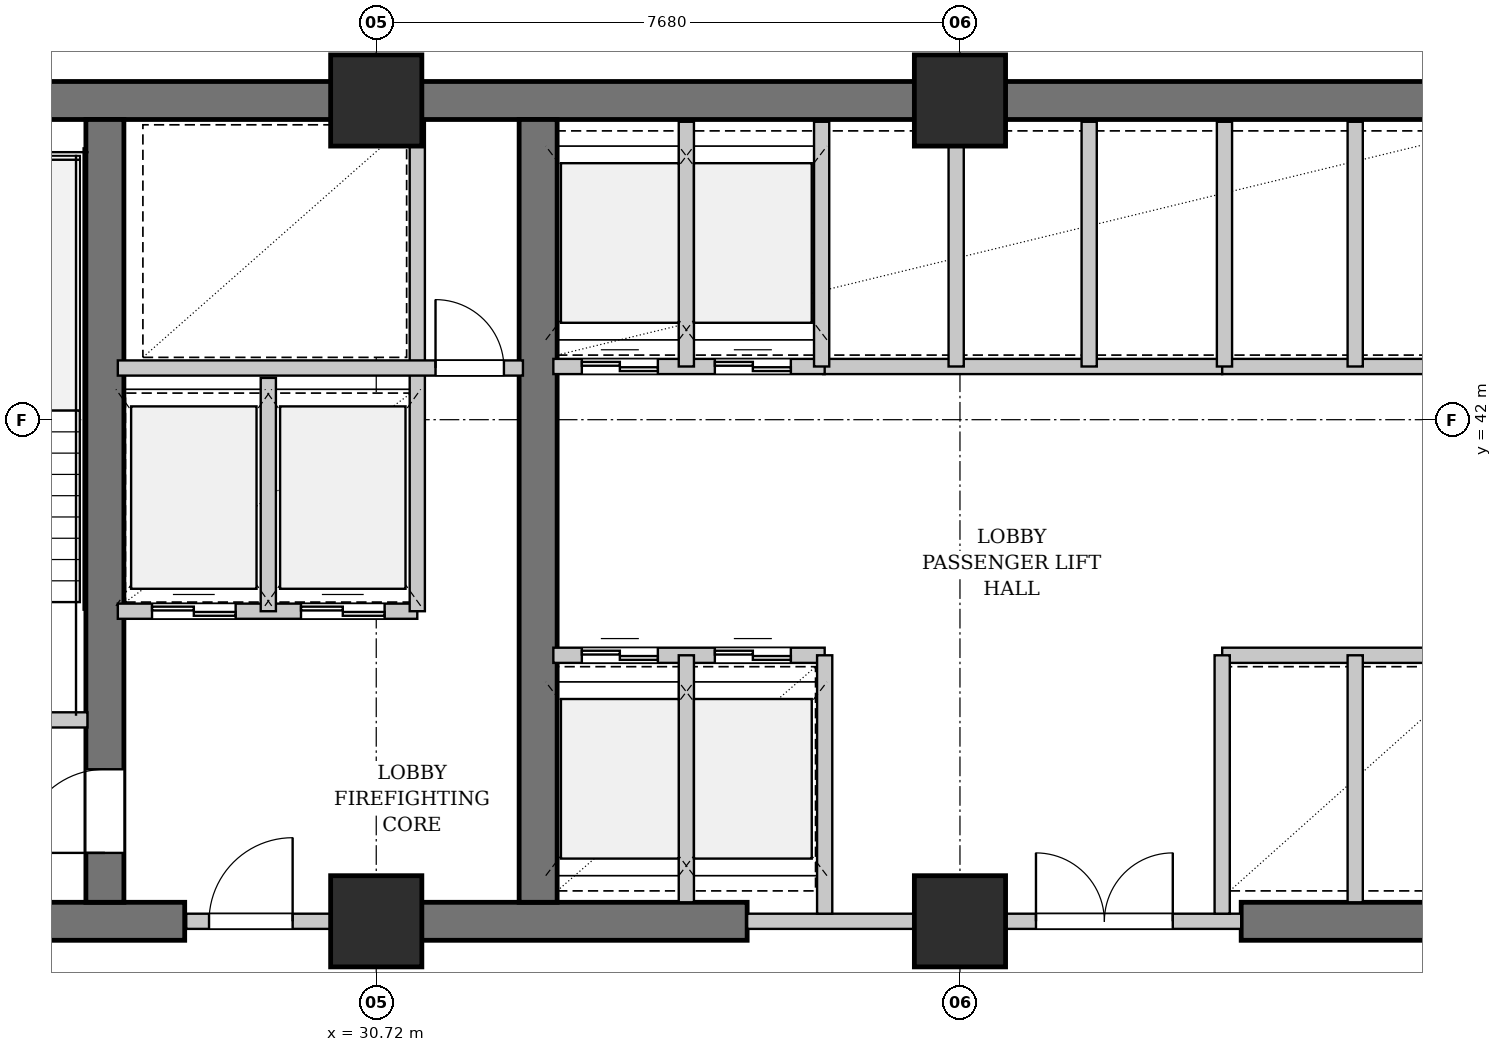
"""IFC4 building model, lengths in metres.
Left out: names, types, materials, properties, quantities, classifications, styles, units other than length and angle.
Written with IfcOpenShell. Run it as: python <this file> out.ifc"""

import sys

from ifc_helpers import new_model, si_unit, direction, frame, frame_2d, origin, origin_2d, place, context, subcontext, project, spatial, rectangle, extrude, element, fill, save


model = new_model("IFC4")
c1 = context("Model", 3, precision=1e-05, world=origin(), true_north=direction((0.0, 1.0)))
c2 = subcontext(c1, "Body", "Model", "MODEL_VIEW")
j1 = project(units=[si_unit("LENGTHUNIT", "METRE"), si_unit("PLANEANGLEUNIT", "RADIAN")], contexts=[c1])
p1 = place(None, origin())
s1 = spatial("IfcSite", under=j1, at=p1, CompositionType="ELEMENT")
p2 = place(p1, origin())
s2 = spatial("IfcBuilding", under=s1, at=p2, CompositionType="ELEMENT")
p3 = place(p2, frame((0.0, 0.0, 54.2)))
s3 = spatial("IfcBuildingStorey", under=s2, at=p3, CompositionType="ELEMENT", Elevation=54.2)
p4 = place(p3, frame((22.79, 46.2, 0.0), z_axis=(0.0, 0.0, 1.0), x_axis=(1.0, 0.0, 0.0)))
e1 = element("IfcWall", 1, at=p4, inside=s3, PredefinedType="SHEAR", context=c2, shape_type="SweptSolid", body=[
    extrude(rectangle(XDim=31.22, YDim=0.5, at=frame_2d((15.61, 0.0))), origin(), (0.0, 0.0, 1.0), 3.18),
])
p5 = place(p3, frame((22.79, 35.4, 0.0), z_axis=(0.0, 0.0, 1.0), x_axis=(1.0, 0.0, 0.0)))
e2 = element("IfcWall", 2, at=p5, inside=s3, PredefinedType="SHEAR", context=c2, shape_type="SweptSolid", body=[
    extrude(rectangle(XDim=5.41, YDim=0.5, at=frame_2d((2.705, 0.0))), origin(), (0.0, 0.0, 1.0), 3.18),
])
p6 = place(p3, frame((30.72, 35.4, 0.0), z_axis=(0.0, 0.0, 1.0), x_axis=(1.0, 0.0, 0.0)))
e3 = element("IfcWall", 3, at=p6, inside=s3, PredefinedType="SHEAR", context=c2, shape_type="SweptSolid", body=[
    extrude(rectangle(XDim=4.88, YDim=0.5, at=frame_2d((2.44, 0.0))), origin(), (0.0, 0.0, 1.0), 3.18),
])
p7 = place(p3, frame((42.1, 35.4, 0.0), z_axis=(0.0, 0.0, 1.0), x_axis=(1.0, 0.0, 0.0)))
e4 = element("IfcWall", 4, at=p7, inside=s3, PredefinedType="SHEAR", context=c2, shape_type="SweptSolid", body=[
    extrude(rectangle(XDim=8.05, YDim=0.5, at=frame_2d((4.025, 0.0))), origin(), (0.0, 0.0, 1.0), 3.18),
])
p8 = place(p7, frame((4.85, 0.0, 0.0)))
e5 = element("IfcOpeningElement", 5, at=p8, cuts=e4, PredefinedType="OPENING", context=c2, shape_type="SweptSolid", body=[
    extrude(rectangle(XDim=0.9, YDim=2.15, at=frame_2d((0.45, 1.075))), frame((0.0, 0.26, 0.0), z_axis=(0.0, -1.0, 0.0), x_axis=(1.0, 0.0, 0.0)), (0.0, 0.0, 1.0), 0.52),
])
p9 = place(p3, frame((27.15, 35.65, 0.0), z_axis=(0.0, 0.0, 1.0), x_axis=(0.0, 1.0, 0.0)))
e6 = element("IfcWall", 6, at=p9, inside=s3, PredefinedType="SHEAR", context=c2, shape_type="SweptSolid", body=[
    extrude(rectangle(XDim=10.3, YDim=0.5, at=frame_2d((5.15, 0.0))), origin(), (0.0, 0.0, 1.0), 3.18),
])
p10 = place(p9, frame((0.65, 0.0, 0.0)))
e7 = element("IfcOpeningElement", 7, at=p10, cuts=e6, PredefinedType="OPENING", context=c2, shape_type="SweptSolid", body=[
    extrude(rectangle(XDim=1.1, YDim=2.15, at=frame_2d((0.55, 1.075))), frame((0.0, 0.26, 0.0), z_axis=(0.0, -1.0, 0.0), x_axis=(1.0, 0.0, 0.0)), (0.0, 0.0, 1.0), 0.52),
])
p11 = place(p3, frame((32.85, 35.65, 0.0), z_axis=(0.0, 0.0, 1.0), x_axis=(0.0, 1.0, 0.0)))
e8 = element("IfcWall", 8, at=p11, inside=s3, PredefinedType="SHEAR", context=c2, shape_type="SweptSolid", body=[
    extrude(rectangle(XDim=10.3, YDim=0.5, at=frame_2d((5.15, 0.0))), origin(), (0.0, 0.0, 1.0), 3.18),
])
for number, where, z_axis, x_axis in (
    (9, (30.72, 35.4, 0.0), (0.0, 0.0, 1.0), (1.0, 0.0, 0.0)),
    (10, (30.72, 46.2, 0.0), (0.0, 0.0, 1.0), (1.0, 0.0, 0.0)),
    (11, (38.4, 35.4, 0.0), (0.0, 0.0, 1.0), (1.0, 0.0, 0.0)),
    (12, (38.4, 46.2, 0.0), (0.0, 0.0, 1.0), (1.0, 0.0, 0.0)),
):
    element("IfcColumn", number, at=place(p3, frame(where, z_axis=z_axis, x_axis=x_axis)), inside=s3, PredefinedType="COLUMN", context=c2, shape_type="SweptSolid", body=[
        extrude(rectangle(XDim=1.2, YDim=1.2, at=origin_2d()), origin(), (0.0, 0.0, 1.0), 3.4),
    ])
p12 = place(p3, frame((23.3, 38.05, 0.0), z_axis=(0.0, 0.0, 1.0), x_axis=(1.0, 0.0, 0.0)))
e13 = element("IfcWall", 13, at=p12, inside=s3, PredefinedType="PARTITIONING", context=c2, shape_type="SweptSolid", body=[
    extrude(rectangle(XDim=3.62, YDim=0.2, at=frame_2d((1.81, 0.0))), origin(), (0.0, 0.0, 1.0), 3.18),
])
p13 = place(p12, frame((1.26, 0.0, 0.0)))
e14 = element("IfcOpeningElement", 14, at=p13, cuts=e13, PredefinedType="OPENING", context=c2, shape_type="SweptSolid", body=[
    extrude(rectangle(XDim=1.1, YDim=2.15, at=frame_2d((0.55, 1.075))), frame((0.0, 0.11, 0.0), z_axis=(0.0, -1.0, 0.0), x_axis=(1.0, 0.0, 0.0)), (0.0, 0.0, 1.0), 0.22),
])
p14 = place(p3, frame((28.22, 35.4, 0.0), z_axis=(0.0, 0.0, 1.0), x_axis=(1.0, 0.0, 0.0)))
e15 = element("IfcWall", 15, at=p14, inside=s3, PredefinedType="PARTITIONING", context=c2, shape_type="SweptSolid", body=[
    extrude(rectangle(XDim=2.5, YDim=0.2, at=frame_2d((1.25, 0.0))), origin(), (0.0, 0.0, 1.0), 2.475),
])
p15 = place(p14, frame((0.3, 0.0, 0.0)))
e16 = element("IfcOpeningElement", 16, at=p15, cuts=e15, PredefinedType="OPENING", context=c2, shape_type="SweptSolid", body=[
    extrude(rectangle(XDim=1.1, YDim=2.15, at=frame_2d((0.55, 1.075))), frame((0.0, 0.11, 0.0), z_axis=(0.0, -1.0, 0.0), x_axis=(1.0, 0.0, 0.0)), (0.0, 0.0, 1.0), 0.22),
])
p16 = place(p3, frame((27.32, 39.48, 0.0), z_axis=(0.0, 0.0, 1.0), x_axis=(1.0, 0.0, 0.0)))
e17 = element("IfcWall", 17, at=p16, inside=s3, PredefinedType="PARTITIONING", context=c2, shape_type="SweptSolid", body=[
    extrude(rectangle(XDim=3.94, YDim=0.2, at=frame_2d((1.97, 0.0))), origin(), (0.0, 0.0, 1.0), 3.18),
])
p17 = place(p16, frame((0.45, 0.0, 0.0)))
e18 = element("IfcOpeningElement", 18, at=p17, cuts=e17, PredefinedType="OPENING", context=c2, shape_type="SweptSolid", body=[
    extrude(rectangle(XDim=1.1, YDim=2.2, at=frame_2d((0.55, 1.1))), frame((0.0, 0.11, 0.0), z_axis=(0.0, -1.0, 0.0), x_axis=(1.0, 0.0, 0.0)), (0.0, 0.0, 1.0), 0.22),
])
p18 = place(p16, frame((2.41, 0.0, 0.0)))
e19 = element("IfcOpeningElement", 19, at=p18, cuts=e17, PredefinedType="OPENING", context=c2, shape_type="SweptSolid", body=[
    extrude(rectangle(XDim=1.1, YDim=2.2, at=frame_2d((0.55, 1.1))), frame((0.0, 0.11, 0.0), z_axis=(0.0, -1.0, 0.0), x_axis=(1.0, 0.0, 0.0)), (0.0, 0.0, 1.0), 0.22),
])
p19 = place(p3, frame((29.3, 39.48, 0.0), z_axis=(0.0, 0.0, 1.0), x_axis=(0.0, 1.0, 0.0)))
e20 = element("IfcWall", 20, at=p19, inside=s3, PredefinedType="PARTITIONING", context=c2, shape_type="SweptSolid", body=[
    extrude(rectangle(XDim=3.07, YDim=0.2, at=frame_2d((1.535, 0.0))), origin(), (0.0, 0.0, 1.0), 3.18),
])
p20 = place(p3, frame((31.26, 39.48, 0.0), z_axis=(0.0, 0.0, 1.0), x_axis=(0.0, 1.0, 0.0)))
e21 = element("IfcWall", 21, at=p20, inside=s3, PredefinedType="PARTITIONING", context=c2, shape_type="SweptSolid", body=[
    extrude(rectangle(XDim=6.44, YDim=0.2, at=frame_2d((3.22, 0.0))), origin(), (0.0, 0.0, 1.0), 3.18),
])
p21 = place(p3, frame((27.32, 42.68, 0.0), z_axis=(0.0, 0.0, 1.0), x_axis=(1.0, 0.0, 0.0)))
e22 = element("IfcWall", 22, at=p21, inside=s3, PredefinedType="PARTITIONING", context=c2, shape_type="SweptSolid", body=[
    extrude(rectangle(XDim=5.33, YDim=0.2, at=frame_2d((2.665, 0.0))), origin(), (0.0, 0.0, 1.0), 3.18),
])
p22 = place(p21, frame((4.18, 0.0, 0.0)))
e23 = element("IfcOpeningElement", 23, at=p22, cuts=e22, PredefinedType="OPENING", context=c2, shape_type="SweptSolid", body=[
    extrude(rectangle(XDim=0.9, YDim=2.15, at=frame_2d((0.45, 1.075))), frame((0.0, 0.11, 0.0), z_axis=(0.0, -1.0, 0.0), x_axis=(1.0, 0.0, 0.0)), (0.0, 0.0, 1.0), 0.22),
])
p23 = place(p3, frame((35.6, 35.4, 0.0), z_axis=(0.0, 0.0, 1.0), x_axis=(1.0, 0.0, 0.0)))
e24 = element("IfcWall", 24, at=p23, inside=s3, PredefinedType="PARTITIONING", context=c2, shape_type="SweptSolid", body=[
    extrude(rectangle(XDim=6.5, YDim=0.2, at=frame_2d((3.25, 0.0))), origin(), (0.0, 0.0, 1.0), 2.475),
])
p24 = place(p23, frame((3.8, 0.0, 0.0)))
e25 = element("IfcOpeningElement", 25, at=p24, cuts=e24, PredefinedType="OPENING", context=c2, shape_type="SweptSolid", body=[
    extrude(rectangle(XDim=1.8, YDim=2.3, at=frame_2d((0.9, 1.15))), frame((0.0, 0.11, 0.0), z_axis=(0.0, -1.0, 0.0), x_axis=(1.0, 0.0, 0.0)), (0.0, 0.0, 1.0), 0.22),
])
p25 = place(p3, frame((36.6, 42.7, 0.0), z_axis=(0.0, 0.0, 1.0), x_axis=(1.0, 0.0, 0.0)))
e26 = element("IfcWall", 26, at=p25, inside=s3, PredefinedType="PARTITIONING", context=c2, shape_type="SweptSolid", body=[
    extrude(rectangle(XDim=5.25, YDim=0.2, at=frame_2d((2.625, 0.0))), origin(), (0.0, 0.0, 1.0), 3.18),
])
p26 = place(p3, frame((38.35, 42.7, 0.0), z_axis=(0.0, 0.0, 1.0), x_axis=(0.0, 1.0, 0.0)))
e27 = element("IfcWall", 27, at=p26, inside=s3, PredefinedType="PARTITIONING", context=c2, shape_type="SweptSolid", body=[
    extrude(rectangle(XDim=3.22, YDim=0.2, at=frame_2d((1.61, 0.0))), origin(), (0.0, 0.0, 1.0), 2.475),
])
p27 = place(p3, frame((40.1, 42.7, 0.0), z_axis=(0.0, 0.0, 1.0), x_axis=(0.0, 1.0, 0.0)))
e28 = element("IfcWall", 28, at=p27, inside=s3, PredefinedType="PARTITIONING", context=c2, shape_type="SweptSolid", body=[
    extrude(rectangle(XDim=3.22, YDim=0.2, at=frame_2d((1.61, 0.0))), origin(), (0.0, 0.0, 1.0), 3.18),
])
p28 = place(p3, frame((33.05, 38.9, 0.0), z_axis=(0.0, 0.0, 1.0), x_axis=(1.0, 0.0, 0.0)))
e29 = element("IfcWall", 29, at=p28, inside=s3, PredefinedType="PARTITIONING", context=c2, shape_type="SweptSolid", body=[
    extrude(rectangle(XDim=3.57, YDim=0.2, at=frame_2d((1.785, 0.0))), origin(), (0.0, 0.0, 1.0), 3.18),
])
p29 = place(p28, frame((0.375, 0.0, 0.0)))
e30 = element("IfcOpeningElement", 30, at=p29, cuts=e29, PredefinedType="OPENING", context=c2, shape_type="SweptSolid", body=[
    extrude(rectangle(XDim=1.0, YDim=2.2, at=frame_2d((0.5, 1.1))), frame((0.0, 0.11, 0.0), z_axis=(0.0, -1.0, 0.0), x_axis=(1.0, 0.0, 0.0)), (0.0, 0.0, 1.0), 0.22),
])
p30 = place(p28, frame((2.125, 0.0, 0.0)))
e31 = element("IfcOpeningElement", 31, at=p30, cuts=e29, PredefinedType="OPENING", context=c2, shape_type="SweptSolid", body=[
    extrude(rectangle(XDim=1.0, YDim=2.2, at=frame_2d((0.5, 1.1))), frame((0.0, 0.11, 0.0), z_axis=(0.0, -1.0, 0.0), x_axis=(1.0, 0.0, 0.0)), (0.0, 0.0, 1.0), 0.22),
])
p31 = place(p3, frame((33.05, 42.7, 0.0), z_axis=(0.0, 0.0, 1.0), x_axis=(1.0, 0.0, 0.0)))
e32 = element("IfcWall", 32, at=p31, inside=s3, PredefinedType="PARTITIONING", context=c2, shape_type="SweptSolid", body=[
    extrude(rectangle(XDim=3.57, YDim=0.2, at=frame_2d((1.785, 0.0))), origin(), (0.0, 0.0, 1.0), 3.18),
])
p32 = place(p31, frame((0.375, 0.0, 0.0)))
e33 = element("IfcOpeningElement", 33, at=p32, cuts=e32, PredefinedType="OPENING", context=c2, shape_type="SweptSolid", body=[
    extrude(rectangle(XDim=1.0, YDim=2.2, at=frame_2d((0.5, 1.1))), frame((0.0, 0.11, 0.0), z_axis=(0.0, -1.0, 0.0), x_axis=(1.0, 0.0, 0.0)), (0.0, 0.0, 1.0), 0.22),
])
p33 = place(p31, frame((2.125, 0.0, 0.0)))
e34 = element("IfcOpeningElement", 34, at=p33, cuts=e32, PredefinedType="OPENING", context=c2, shape_type="SweptSolid", body=[
    extrude(rectangle(XDim=1.0, YDim=2.2, at=frame_2d((0.5, 1.1))), frame((0.0, 0.11, 0.0), z_axis=(0.0, -1.0, 0.0), x_axis=(1.0, 0.0, 0.0)), (0.0, 0.0, 1.0), 0.22),
])
p34 = place(p3, frame((34.8, 35.65, 0.0), z_axis=(0.0, 0.0, 1.0), x_axis=(0.0, 1.0, 0.0)))
e35 = element("IfcWall", 35, at=p34, inside=s3, PredefinedType="PARTITIONING", context=c2, shape_type="SweptSolid", body=[
    extrude(rectangle(XDim=3.25, YDim=0.2, at=frame_2d((1.625, 0.0))), origin(), (0.0, 0.0, 1.0), 3.18),
])
p35 = place(p3, frame((34.8, 42.7, 0.0), z_axis=(0.0, 0.0, 1.0), x_axis=(0.0, 1.0, 0.0)))
e36 = element("IfcWall", 36, at=p35, inside=s3, PredefinedType="PARTITIONING", context=c2, shape_type="SweptSolid", body=[
    extrude(rectangle(XDim=3.22, YDim=0.2, at=frame_2d((1.61, 0.0))), origin(), (0.0, 0.0, 1.0), 3.18),
])
p36 = place(p3, frame((36.62, 35.5, 0.0), z_axis=(0.0, 0.0, 1.0), x_axis=(0.0, 1.0, 0.0)))
e37 = element("IfcWall", 37, at=p36, inside=s3, PredefinedType="PARTITIONING", context=c2, shape_type="SweptSolid", body=[
    extrude(rectangle(XDim=3.4, YDim=0.2, at=frame_2d((1.7, 0.0))), origin(), (0.0, 0.0, 1.0), 3.18),
])
p37 = place(p3, frame((36.58, 42.7, 0.0), z_axis=(0.0, 0.0, 1.0), x_axis=(0.0, 1.0, 0.0)))
e38 = element("IfcWall", 38, at=p37, inside=s3, PredefinedType="PARTITIONING", context=c2, shape_type="SweptSolid", body=[
    extrude(rectangle(XDim=3.22, YDim=0.2, at=frame_2d((1.61, 0.0))), origin(), (0.0, 0.0, 1.0), 3.18),
])
for number, where, z_axis, x_axis in (
    (39, (41.85, 38.9, 0.0), (0.0, 0.0, 1.0), (1.0, 0.0, 0.0)),
    (40, (41.85, 42.7, 0.0), (0.0, 0.0, 1.0), (1.0, 0.0, 0.0)),
):
    element("IfcWall", number, at=place(p3, frame(where, z_axis=z_axis, x_axis=x_axis)), inside=s3, PredefinedType="PARTITIONING", context=c2, shape_type="SweptSolid", body=[
        extrude(rectangle(XDim=3.37, YDim=0.2, at=frame_2d((1.685, 0.0))), origin(), (0.0, 0.0, 1.0), 3.18),
    ])
p38 = place(p3, frame((43.6, 35.65, 0.0), z_axis=(0.0, 0.0, 1.0), x_axis=(0.0, 1.0, 0.0)))
e41 = element("IfcWall", 41, at=p38, inside=s3, PredefinedType="PARTITIONING", context=c2, shape_type="SweptSolid", body=[
    extrude(rectangle(XDim=3.25, YDim=0.2, at=frame_2d((1.625, 0.0))), origin(), (0.0, 0.0, 1.0), 3.18),
])
p39 = place(p3, frame((43.6, 42.7, 0.0), z_axis=(0.0, 0.0, 1.0), x_axis=(0.0, 1.0, 0.0)))
e42 = element("IfcWall", 42, at=p39, inside=s3, PredefinedType="PARTITIONING", context=c2, shape_type="SweptSolid", body=[
    extrude(rectangle(XDim=3.22, YDim=0.2, at=frame_2d((1.61, 0.0))), origin(), (0.0, 0.0, 1.0), 3.18),
])
p40 = place(p3, frame((41.85, 35.5, 0.0), z_axis=(0.0, 0.0, 1.0), x_axis=(0.0, 1.0, 0.0)))
e43 = element("IfcWall", 43, at=p40, inside=s3, PredefinedType="PARTITIONING", context=c2, shape_type="SweptSolid", body=[
    extrude(rectangle(XDim=3.4, YDim=0.2, at=frame_2d((1.7, 0.0))), origin(), (0.0, 0.0, 1.0), 3.18),
])
p41 = place(p3, frame((41.88, 42.7, 0.0), z_axis=(0.0, 0.0, 1.0), x_axis=(0.0, 1.0, 0.0)))
e44 = element("IfcWall", 44, at=p41, inside=s3, PredefinedType="PARTITIONING", context=c2, shape_type="SweptSolid", body=[
    extrude(rectangle(XDim=3.22, YDim=0.2, at=frame_2d((1.61, 0.0))), origin(), (0.0, 0.0, 1.0), 3.18),
])
p42 = place(p15, origin())
e45 = element("IfcDoor", 45, at=p42, inside=s3, OperationType="SINGLE_SWING_RIGHT", PredefinedType="DOOR", context=c2, shape_type="SweptSolid", body=[
    extrude(rectangle(XDim=1.1, YDim=2.15, at=frame_2d((0.55, 1.075))), frame((0.0, 0.025, 0.0), z_axis=(0.0, -1.0, 0.0), x_axis=(1.0, 0.0, 0.0)), (0.0, 0.0, 1.0), 0.05),
])
fill(e16, e45)
p43 = place(p17, origin())
e46 = element("IfcDoor", 46, at=p43, inside=s3, OperationType="DOUBLE_DOOR_SLIDING", PredefinedType="DOOR", context=c2, shape_type="SweptSolid", body=[
    extrude(rectangle(XDim=1.1, YDim=2.2, at=frame_2d((0.55, 1.1))), frame((0.0, 0.025, 0.0), z_axis=(0.0, -1.0, 0.0), x_axis=(1.0, 0.0, 0.0)), (0.0, 0.0, 1.0), 0.05),
])
fill(e18, e46)
p44 = place(p18, origin())
e47 = element("IfcDoor", 47, at=p44, inside=s3, OperationType="DOUBLE_DOOR_SLIDING", PredefinedType="DOOR", context=c2, shape_type="SweptSolid", body=[
    extrude(rectangle(XDim=1.1, YDim=2.2, at=frame_2d((0.55, 1.1))), frame((0.0, 0.025, 0.0), z_axis=(0.0, -1.0, 0.0), x_axis=(1.0, 0.0, 0.0)), (0.0, 0.0, 1.0), 0.05),
])
fill(e19, e47)
p45 = place(p22, origin())
e48 = element("IfcDoor", 48, at=p45, inside=s3, OperationType="SINGLE_SWING_LEFT", PredefinedType="DOOR", context=c2, shape_type="SweptSolid", body=[
    extrude(rectangle(XDim=0.9, YDim=2.15, at=frame_2d((0.45, 1.075))), frame((0.0, 0.025, 0.0), z_axis=(0.0, -1.0, 0.0), x_axis=(1.0, 0.0, 0.0)), (0.0, 0.0, 1.0), 0.05),
])
fill(e23, e48)
p46 = place(p24, origin())
e49 = element("IfcDoor", 49, at=p46, inside=s3, OperationType="DOUBLE_DOOR_SINGLE_SWING", PredefinedType="DOOR", context=c2, shape_type="SweptSolid", body=[
    extrude(rectangle(XDim=1.8, YDim=2.3, at=frame_2d((0.9, 1.15))), frame((0.0, 0.025, 0.0), z_axis=(0.0, -1.0, 0.0), x_axis=(1.0, 0.0, 0.0)), (0.0, 0.0, 1.0), 0.05),
])
fill(e25, e49)
p47 = place(p29, origin())
e50 = element("IfcDoor", 50, at=p47, inside=s3, OperationType="DOUBLE_DOOR_SLIDING", PredefinedType="DOOR", context=c2, shape_type="SweptSolid", body=[
    extrude(rectangle(XDim=1.0, YDim=2.2, at=frame_2d((0.5, 1.1))), frame((0.0, 0.025, 0.0), z_axis=(0.0, -1.0, 0.0), x_axis=(1.0, 0.0, 0.0)), (0.0, 0.0, 1.0), 0.05),
])
fill(e30, e50)
p48 = place(p30, origin())
e51 = element("IfcDoor", 51, at=p48, inside=s3, OperationType="DOUBLE_DOOR_SLIDING", PredefinedType="DOOR", context=c2, shape_type="SweptSolid", body=[
    extrude(rectangle(XDim=1.0, YDim=2.2, at=frame_2d((0.5, 1.1))), frame((0.0, 0.025, 0.0), z_axis=(0.0, -1.0, 0.0), x_axis=(1.0, 0.0, 0.0)), (0.0, 0.0, 1.0), 0.05),
])
fill(e31, e51)
p49 = place(p32, origin())
e52 = element("IfcDoor", 52, at=p49, inside=s3, OperationType="DOUBLE_DOOR_SLIDING", PredefinedType="DOOR", context=c2, shape_type="SweptSolid", body=[
    extrude(rectangle(XDim=1.0, YDim=2.2, at=frame_2d((0.5, 1.1))), frame((0.0, 0.025, 0.0), z_axis=(0.0, -1.0, 0.0), x_axis=(1.0, 0.0, 0.0)), (0.0, 0.0, 1.0), 0.05),
])
fill(e33, e52)
p50 = place(p33, origin())
e53 = element("IfcDoor", 53, at=p50, inside=s3, OperationType="DOUBLE_DOOR_SLIDING", PredefinedType="DOOR", context=c2, shape_type="SweptSolid", body=[
    extrude(rectangle(XDim=1.0, YDim=2.2, at=frame_2d((0.5, 1.1))), frame((0.0, 0.025, 0.0), z_axis=(0.0, -1.0, 0.0), x_axis=(1.0, 0.0, 0.0)), (0.0, 0.0, 1.0), 0.05),
])
fill(e34, e53)
p51 = place(p10, origin())
e54 = element("IfcDoor", 54, at=p51, inside=s3, OperationType="SINGLE_SWING_LEFT", PredefinedType="DOOR", context=c2, shape_type="SweptSolid", body=[
    extrude(rectangle(XDim=1.1, YDim=2.15, at=frame_2d((0.55, 1.075))), frame((0.0, 0.025, 0.0), z_axis=(0.0, -1.0, 0.0), x_axis=(1.0, 0.0, 0.0)), (0.0, 0.0, 1.0), 0.05),
])
fill(e7, e54)
save(model, sys.argv[1])
